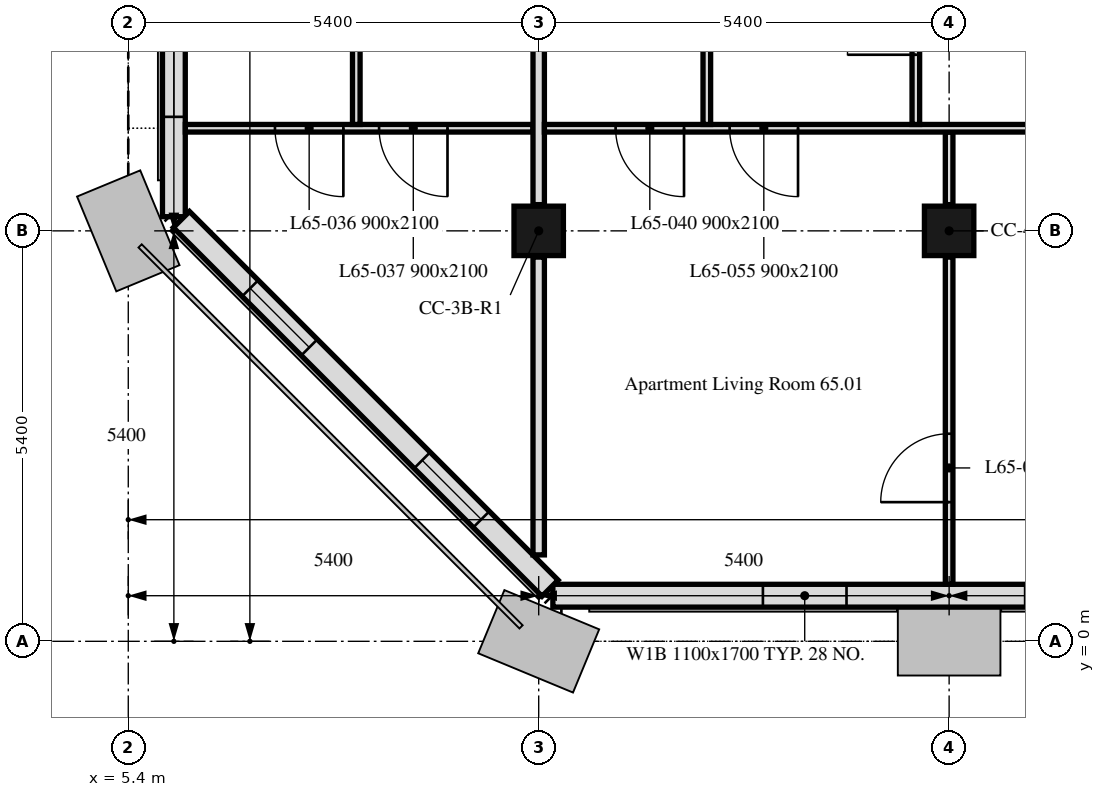
"""IFC4 building model, lengths in metres.
Left out: names, types, materials, properties, quantities, classifications, styles, units other than length and angle.
Written with IfcOpenShell. Run it as: python <this file> out.ifc"""

import sys

from ifc_helpers import new_model, si_unit, direction, frame, frame_2d, origin, origin_2d, place, context, subcontext, project, spatial, rectangle, extrude, element, fill, save


model = new_model("IFC4")
c1 = context("Model", 3, precision=1e-05, world=origin(), true_north=direction((0.0, 1.0)))
c2 = subcontext(c1, "Body", "Model", "MODEL_VIEW")
j1 = project(units=[si_unit("LENGTHUNIT", "METRE"), si_unit("PLANEANGLEUNIT", "RADIAN")], contexts=[c1])
p1 = place(None, origin())
s1 = spatial("IfcSite", under=j1, at=p1, CompositionType="ELEMENT")
p2 = place(p1, origin())
s2 = spatial("IfcBuilding", under=s1, at=p2, CompositionType="ELEMENT")
p3 = place(p2, frame((0.0, 0.0, 268.6)))
s3 = spatial("IfcBuildingStorey", under=s2, at=p3, CompositionType="ELEMENT", Elevation=268.6)
for number, where, z_axis, x_axis in (
    (1, (10.8, 5.4, 0.0), (0.0, 0.0, 1.0), (1.0, 0.0, 0.0)),
    (2, (16.2, 5.4, 0.0), (0.0, 0.0, 1.0), (1.0, 0.0, 0.0)),
):
    element("IfcColumn", number, at=place(p3, frame(where, z_axis=z_axis, x_axis=x_axis)), inside=s3, PredefinedType="COLUMN", context=c2, shape_type="SweptSolid", body=[
        extrude(rectangle(XDim=0.65, YDim=0.65, at=origin_2d()), origin(), (0.0, 0.0, 1.0), 3.0),
    ])
p4 = place(p3, frame((10.986, 0.6, 0.0), z_axis=(0.0, 0.0, 1.0), x_axis=(1.0, 0.0, 0.0)))
e3 = element("IfcWall", 3, at=p4, inside=s3, PredefinedType="SOLIDWALL", context=c2, shape_type="SweptSolid", body=[
    extrude(rectangle(XDim=32.027, YDim=0.3, at=frame_2d((16.014, 0.0))), origin(), (0.0, 0.0, 1.0), 3.0),
])
p5 = place(p4, frame((2.764, 0.0, 0.9)))
e4 = element("IfcOpeningElement", 4, at=p5, cuts=e3, PredefinedType="OPENING", context=c2, shape_type="SweptSolid", body=[
    extrude(rectangle(XDim=1.1, YDim=1.7, at=frame_2d((0.55, 0.85))), frame((0.0, 0.16, 0.0), z_axis=(0.0, -1.0, 0.0), x_axis=(1.0, 0.0, 0.0)), (0.0, 0.0, 1.0), 0.32),
])
p6 = place(p4, frame((6.214, 0.0, 0.9)))
e5 = element("IfcOpeningElement", 5, at=p6, cuts=e3, PredefinedType="OPENING", context=c2, shape_type="SweptSolid", body=[
    extrude(rectangle(XDim=3.4, YDim=1.7, at=frame_2d((1.7, 0.85))), frame((0.0, 0.16, 0.0), z_axis=(0.0, -1.0, 0.0), x_axis=(1.0, 0.0, 0.0)), (0.0, 0.0, 1.0), 0.32),
])
p7 = place(p4, frame((13.564, 0.0, 0.9)))
e6 = element("IfcOpeningElement", 6, at=p7, cuts=e3, PredefinedType="OPENING", context=c2, shape_type="SweptSolid", body=[
    extrude(rectangle(XDim=1.1, YDim=1.7, at=frame_2d((0.55, 0.85))), frame((0.0, 0.16, 0.0), z_axis=(0.0, -1.0, 0.0), x_axis=(1.0, 0.0, 0.0)), (0.0, 0.0, 1.0), 0.32),
])
p8 = place(p4, frame((17.014, 0.0, 0.9)))
e7 = element("IfcOpeningElement", 7, at=p8, cuts=e3, PredefinedType="OPENING", context=c2, shape_type="SweptSolid", body=[
    extrude(rectangle(XDim=3.4, YDim=1.7, at=frame_2d((1.7, 0.85))), frame((0.0, 0.16, 0.0), z_axis=(0.0, -1.0, 0.0), x_axis=(1.0, 0.0, 0.0)), (0.0, 0.0, 1.0), 0.32),
])
p9 = place(p4, frame((24.364, 0.0, 0.9)))
e8 = element("IfcOpeningElement", 8, at=p9, cuts=e3, PredefinedType="OPENING", context=c2, shape_type="SweptSolid", body=[
    extrude(rectangle(XDim=1.1, YDim=1.7, at=frame_2d((0.55, 0.85))), frame((0.0, 0.16, 0.0), z_axis=(0.0, -1.0, 0.0), x_axis=(1.0, 0.0, 0.0)), (0.0, 0.0, 1.0), 0.32),
])
p10 = place(p4, frame((27.814, 0.0, 0.9)))
e9 = element("IfcOpeningElement", 9, at=p10, cuts=e3, PredefinedType="OPENING", context=c2, shape_type="SweptSolid", body=[
    extrude(rectangle(XDim=3.4, YDim=1.7, at=frame_2d((1.7, 0.85))), frame((0.0, 0.16, 0.0), z_axis=(0.0, -1.0, 0.0), x_axis=(1.0, 0.0, 0.0)), (0.0, 0.0, 1.0), 0.32),
])
p11 = place(p3, frame((6.0, 16.2, 0.0), z_axis=(0.0, 0.0, 1.0), x_axis=(0.0, -1.0, 0.0)))
e10 = element("IfcWall", 10, at=p11, inside=s3, PredefinedType="SOLIDWALL", context=c2, shape_type="SweptSolid", body=[
    extrude(rectangle(XDim=10.614, YDim=0.3, at=frame_2d((5.307, 0.0))), origin(), (0.0, 0.0, 1.0), 3.0),
])
p12 = place(p11, frame((1.0, 0.0, 0.9)))
e11 = element("IfcOpeningElement", 11, at=p12, cuts=e10, PredefinedType="OPENING", context=c2, shape_type="SweptSolid", body=[
    extrude(rectangle(XDim=1.1, YDim=1.7, at=frame_2d((0.55, 0.85))), frame((0.0, 0.16, 0.0), z_axis=(0.0, -1.0, 0.0), x_axis=(1.0, 0.0, 0.0)), (0.0, 0.0, 1.0), 0.32),
])
p13 = place(p11, frame((2.95, 0.0, 0.9)))
e12 = element("IfcOpeningElement", 12, at=p13, cuts=e10, PredefinedType="OPENING", context=c2, shape_type="SweptSolid", body=[
    extrude(rectangle(XDim=1.1, YDim=1.7, at=frame_2d((0.55, 0.85))), frame((0.0, 0.16, 0.0), z_axis=(0.0, -1.0, 0.0), x_axis=(1.0, 0.0, 0.0)), (0.0, 0.0, 1.0), 0.32),
])
p14 = place(p11, frame((6.75, 0.0, 0.9)))
e13 = element("IfcOpeningElement", 13, at=p14, cuts=e10, PredefinedType="OPENING", context=c2, shape_type="SweptSolid", body=[
    extrude(rectangle(XDim=1.1, YDim=1.7, at=frame_2d((0.55, 0.85))), frame((0.0, 0.16, 0.0), z_axis=(0.0, -1.0, 0.0), x_axis=(1.0, 0.0, 0.0)), (0.0, 0.0, 1.0), 0.32),
])
p15 = place(p11, frame((8.2, 0.0, 0.9)))
e14 = element("IfcOpeningElement", 14, at=p15, cuts=e10, PredefinedType="OPENING", context=c2, shape_type="SweptSolid", body=[
    extrude(rectangle(XDim=1.1, YDim=1.7, at=frame_2d((0.55, 0.85))), frame((0.0, 0.16, 0.0), z_axis=(0.0, -1.0, 0.0), x_axis=(1.0, 0.0, 0.0)), (0.0, 0.0, 1.0), 0.32),
])
p16 = place(p3, frame((6.099, 5.55, 0.0), z_axis=(0.0, 0.0, 1.0), x_axis=(0.707106781187, -0.707106781187, 0.0)))
e15 = element("IfcWall", 15, at=p16, inside=s3, PredefinedType="SOLIDWALL", context=c2, shape_type="SweptSolid", body=[
    extrude(rectangle(XDim=6.86, YDim=0.3, at=frame_2d((3.43, 0.0))), origin(), (0.0, 0.0, 1.0), 3.0),
])
p17 = place(p16, frame((1.28, 0.0, 0.9)))
e16 = element("IfcOpeningElement", 16, at=p17, cuts=e15, PredefinedType="OPENING", context=c2, shape_type="SweptSolid", body=[
    extrude(rectangle(XDim=1.1, YDim=1.7, at=frame_2d((0.55, 0.85))), frame((0.0, 0.16, 0.0), z_axis=(0.0, -1.0, 0.0), x_axis=(1.0, 0.0, 0.0)), (0.0, 0.0, 1.0), 0.32),
])
p18 = place(p16, frame((4.48, 0.0, 0.9)))
e17 = element("IfcOpeningElement", 17, at=p18, cuts=e15, PredefinedType="OPENING", context=c2, shape_type="SweptSolid", body=[
    extrude(rectangle(XDim=1.1, YDim=1.7, at=frame_2d((0.55, 0.85))), frame((0.0, 0.16, 0.0), z_axis=(0.0, -1.0, 0.0), x_axis=(1.0, 0.0, 0.0)), (0.0, 0.0, 1.0), 0.32),
])
p19 = place(p3, frame((10.8, 1.137, 0.0), z_axis=(0.0, 0.0, 1.0), x_axis=(0.0, 1.0, 0.0)))
e18 = element("IfcWall", 18, at=p19, inside=s3, PredefinedType="PARTITIONING", context=c2, shape_type="SweptSolid", body=[
    extrude(rectangle(XDim=3.918, YDim=0.15, at=frame_2d((1.959, 0.0))), origin(), (0.0, 0.0, 1.0), 3.0),
])
p20 = place(p3, frame((10.725, 6.75, 0.0), z_axis=(0.0, 0.0, 1.0), x_axis=(-1.0, 0.0, 0.0)))
e19 = element("IfcWall", 19, at=p20, inside=s3, PredefinedType="PARTITIONING", context=c2, shape_type="SweptSolid", body=[
    extrude(rectangle(XDim=4.574, YDim=0.1, at=frame_2d((2.287, 0.0))), origin(), (0.0, 0.0, 1.0), 3.0),
])
p21 = place(p20, frame((2.495, 0.0, 0.0)))
e20 = element("IfcOpeningElement", 20, at=p21, cuts=e19, PredefinedType="OPENING", context=c2, shape_type="SweptSolid", body=[
    extrude(rectangle(XDim=0.9, YDim=2.1, at=frame_2d((0.45, 1.05))), frame((0.0, 0.05, 0.0), z_axis=(0.0, -1.0, 0.0), x_axis=(1.0, 0.0, 0.0)), (0.0, 0.0, 1.0), 0.1),
])
p22 = place(p20, frame((1.125, 0.0, 0.0)))
e21 = element("IfcOpeningElement", 21, at=p22, cuts=e19, PredefinedType="OPENING", context=c2, shape_type="SweptSolid", body=[
    extrude(rectangle(XDim=0.9, YDim=2.1, at=frame_2d((0.45, 1.05))), frame((0.0, 0.05, 0.0), z_axis=(0.0, -1.0, 0.0), x_axis=(1.0, 0.0, 0.0)), (0.0, 0.0, 1.0), 0.1),
])
p23 = place(p3, frame((8.4, 6.8, 0.0), z_axis=(0.0, 0.0, 1.0), x_axis=(0.0, 1.0, 0.0)))
e22 = element("IfcWall", 22, at=p23, inside=s3, PredefinedType="PARTITIONING", context=c2, shape_type="SweptSolid", body=[
    extrude(rectangle(XDim=7.075, YDim=0.1, at=frame_2d((3.538, 0.0))), origin(), (0.0, 0.0, 1.0), 3.0),
])
p24 = place(p23, frame((5.45, 0.0, 0.0)))
e23 = element("IfcOpeningElement", 23, at=p24, cuts=e22, PredefinedType="OPENING", context=c2, shape_type="SweptSolid", body=[
    extrude(rectangle(XDim=0.9, YDim=2.1, at=frame_2d((0.45, 1.05))), frame((0.0, 0.05, 0.0), z_axis=(0.0, -1.0, 0.0), x_axis=(1.0, 0.0, 0.0)), (0.0, 0.0, 1.0), 0.1),
])
p25 = place(p23, frame((1.717, 0.0, 0.0)))
e24 = element("IfcOpeningElement", 24, at=p25, cuts=e22, PredefinedType="OPENING", context=c2, shape_type="SweptSolid", body=[
    extrude(rectangle(XDim=0.9, YDim=2.1, at=frame_2d((0.45, 1.05))), frame((0.0, 0.05, 0.0), z_axis=(0.0, -1.0, 0.0), x_axis=(1.0, 0.0, 0.0)), (0.0, 0.0, 1.0), 0.1),
])
p26 = place(p3, frame((10.8, 5.745, 0.0), z_axis=(0.0, 0.0, 1.0), x_axis=(0.0, 1.0, 0.0)))
e25 = element("IfcWall", 25, at=p26, inside=s3, PredefinedType="PARTITIONING", context=c2, shape_type="SweptSolid", body=[
    extrude(rectangle(XDim=4.71, YDim=0.15, at=frame_2d((2.355, 0.0))), origin(), (0.0, 0.0, 1.0), 3.0),
])
p27 = place(p3, frame((16.2, 0.751, 0.0), z_axis=(0.0, 0.0, 1.0), x_axis=(0.0, 1.0, 0.0)))
e26 = element("IfcWall", 26, at=p27, inside=s3, PredefinedType="PARTITIONING", context=c2, shape_type="SweptSolid", body=[
    extrude(rectangle(XDim=4.304, YDim=0.1, at=frame_2d((2.152, 0.0))), origin(), (0.0, 0.0, 1.0), 2.4),
])
p28 = place(p27, frame((1.08, 0.0, 0.0)))
e27 = element("IfcOpeningElement", 27, at=p28, cuts=e26, PredefinedType="OPENING", context=c2, shape_type="SweptSolid", body=[
    extrude(rectangle(XDim=0.9, YDim=2.1, at=frame_2d((0.45, 1.05))), frame((0.0, 0.05, 0.0), z_axis=(0.0, -1.0, 0.0), x_axis=(1.0, 0.0, 0.0)), (0.0, 0.0, 1.0), 0.1),
])
p29 = place(p3, frame((16.2, 5.745, 0.0), z_axis=(0.0, 0.0, 1.0), x_axis=(0.0, 1.0, 0.0)))
e28 = element("IfcWall", 28, at=p29, inside=s3, PredefinedType="PARTITIONING", context=c2, shape_type="SweptSolid", body=[
    extrude(rectangle(XDim=0.955, YDim=0.1, at=frame_2d((0.478, 0.0))), origin(), (0.0, 0.0, 1.0), 2.4),
])
p30 = place(p3, frame((21.525, 6.75, 0.0), z_axis=(0.0, 0.0, 1.0), x_axis=(-1.0, 0.0, 0.0)))
e29 = element("IfcWall", 29, at=p30, inside=s3, PredefinedType="PARTITIONING", context=c2, shape_type="SweptSolid", body=[
    extrude(rectangle(XDim=10.65, YDim=0.1, at=frame_2d((5.325, 0.0))), origin(), (0.0, 0.0, 1.0), 2.4),
])
p31 = place(p30, frame((8.813, 0.0, 0.0)))
e30 = element("IfcOpeningElement", 30, at=p31, cuts=e29, PredefinedType="OPENING", context=c2, shape_type="SweptSolid", body=[
    extrude(rectangle(XDim=0.9, YDim=2.1, at=frame_2d((0.45, 1.05))), frame((0.0, 0.05, 0.0), z_axis=(0.0, -1.0, 0.0), x_axis=(1.0, 0.0, 0.0)), (0.0, 0.0, 1.0), 0.1),
])
p32 = place(p30, frame((1.675, 0.0, 0.0)))
e31 = element("IfcOpeningElement", 31, at=p32, cuts=e29, PredefinedType="OPENING", context=c2, shape_type="SweptSolid", body=[
    extrude(rectangle(XDim=0.9, YDim=2.1, at=frame_2d((0.45, 1.05))), frame((0.0, 0.05, 0.0), z_axis=(0.0, -1.0, 0.0), x_axis=(1.0, 0.0, 0.0)), (0.0, 0.0, 1.0), 0.1),
])
p33 = place(p30, frame((7.313, 0.0, 0.0)))
e32 = element("IfcOpeningElement", 32, at=p33, cuts=e29, PredefinedType="OPENING", context=c2, shape_type="SweptSolid", body=[
    extrude(rectangle(XDim=0.9, YDim=2.1, at=frame_2d((0.45, 1.05))), frame((0.0, 0.05, 0.0), z_axis=(0.0, -1.0, 0.0), x_axis=(1.0, 0.0, 0.0)), (0.0, 0.0, 1.0), 0.1),
])
p34 = place(p3, frame((13.012, 6.8, 0.0), z_axis=(0.0, 0.0, 1.0), x_axis=(0.0, 1.0, 0.0)))
e33 = element("IfcWall", 33, at=p34, inside=s3, PredefinedType="PARTITIONING", context=c2, shape_type="SweptSolid", body=[
    extrude(rectangle(XDim=7.075, YDim=0.1, at=frame_2d((3.538, 0.0))), origin(), (0.0, 0.0, 1.0), 3.0),
])
p35 = place(p34, frame((5.617, 0.0, 0.0)))
e34 = element("IfcOpeningElement", 34, at=p35, cuts=e33, PredefinedType="OPENING", context=c2, shape_type="SweptSolid", body=[
    extrude(rectangle(XDim=0.9, YDim=2.1, at=frame_2d((0.45, 1.05))), frame((0.0, 0.05, 0.0), z_axis=(0.0, -1.0, 0.0), x_axis=(1.0, 0.0, 0.0)), (0.0, 0.0, 1.0), 0.1),
])
p36 = place(p34, frame((1.45, 0.0, 0.0)))
e35 = element("IfcOpeningElement", 35, at=p36, cuts=e33, PredefinedType="OPENING", context=c2, shape_type="SweptSolid", body=[
    extrude(rectangle(XDim=0.9, YDim=2.1, at=frame_2d((0.45, 1.05))), frame((0.0, 0.05, 0.0), z_axis=(0.0, -1.0, 0.0), x_axis=(1.0, 0.0, 0.0)), (0.0, 0.0, 1.0), 0.1),
])
p37 = place(p3, frame((15.762, 6.8, 0.0), z_axis=(0.0, 0.0, 1.0), x_axis=(0.0, 1.0, 0.0)))
e36 = element("IfcWall", 36, at=p37, inside=s3, PredefinedType="PARTITIONING", context=c2, shape_type="SweptSolid", body=[
    extrude(rectangle(XDim=7.075, YDim=0.1, at=frame_2d((3.538, 0.0))), origin(), (0.0, 0.0, 1.0), 3.0),
])
p38 = place(p37, frame((0.917, 0.0, 0.0)))
e37 = element("IfcOpeningElement", 37, at=p38, cuts=e36, PredefinedType="OPENING", context=c2, shape_type="SweptSolid", body=[
    extrude(rectangle(XDim=0.9, YDim=2.1, at=frame_2d((0.45, 1.05))), frame((0.0, 0.05, 0.0), z_axis=(0.0, -1.0, 0.0), x_axis=(1.0, 0.0, 0.0)), (0.0, 0.0, 1.0), 0.1),
])
p39 = place(p37, frame((5.925, 0.0, 0.0)))
e38 = element("IfcOpeningElement", 38, at=p39, cuts=e36, PredefinedType="OPENING", context=c2, shape_type="SweptSolid", body=[
    extrude(rectangle(XDim=0.9, YDim=2.1, at=frame_2d((0.45, 1.05))), frame((0.0, 0.05, 0.0), z_axis=(0.0, -1.0, 0.0), x_axis=(1.0, 0.0, 0.0)), (0.0, 0.0, 1.0), 0.1),
])
p40 = place(p5, origin())
e39 = element("IfcWindow", 39, at=p40, inside=s3, PartitioningType="SINGLE_PANEL", PredefinedType="WINDOW", context=c2, shape_type="SweptSolid", body=[
    extrude(rectangle(XDim=1.1, YDim=1.7, at=frame_2d((0.55, 0.85))), frame((0.0, 0.03, 0.0), z_axis=(0.0, -1.0, 0.0), x_axis=(1.0, 0.0, 0.0)), (0.0, 0.0, 1.0), 0.06),
])
fill(e4, e39)
p41 = place(p15, origin())
e40 = element("IfcWindow", 40, at=p41, inside=s3, PartitioningType="SINGLE_PANEL", PredefinedType="WINDOW", context=c2, shape_type="SweptSolid", body=[
    extrude(rectangle(XDim=1.1, YDim=1.7, at=frame_2d((0.55, 0.85))), frame((0.0, 0.03, 0.0), z_axis=(0.0, -1.0, 0.0), x_axis=(1.0, 0.0, 0.0)), (0.0, 0.0, 1.0), 0.06),
])
fill(e14, e40)
p42 = place(p17, origin())
e41 = element("IfcWindow", 41, at=p42, inside=s3, PartitioningType="SINGLE_PANEL", PredefinedType="WINDOW", context=c2, shape_type="SweptSolid", body=[
    extrude(rectangle(XDim=1.1, YDim=1.7, at=frame_2d((0.55, 0.85))), frame((0.0, 0.03, 0.0), z_axis=(0.0, -1.0, 0.0), x_axis=(1.0, 0.0, 0.0)), (0.0, 0.0, 1.0), 0.06),
])
fill(e16, e41)
p43 = place(p18, origin())
e42 = element("IfcWindow", 42, at=p43, inside=s3, PartitioningType="SINGLE_PANEL", PredefinedType="WINDOW", context=c2, shape_type="SweptSolid", body=[
    extrude(rectangle(XDim=1.1, YDim=1.7, at=frame_2d((0.55, 0.85))), frame((0.0, 0.03, 0.0), z_axis=(0.0, -1.0, 0.0), x_axis=(1.0, 0.0, 0.0)), (0.0, 0.0, 1.0), 0.06),
])
fill(e17, e42)
p44 = place(p38, origin())
e43 = element("IfcDoor", 43, at=p44, inside=s3, OperationType="SINGLE_SWING_RIGHT", PredefinedType="DOOR", context=c2, shape_type="SweptSolid", body=[
    extrude(rectangle(XDim=0.9, YDim=2.1, at=frame_2d((0.45, 1.05))), frame((0.0, 0.025, 0.0), z_axis=(0.0, -1.0, 0.0), x_axis=(1.0, 0.0, 0.0)), (0.0, 0.0, 1.0), 0.05),
])
fill(e37, e43)
p45 = place(p21, origin())
e44 = element("IfcDoor", 44, at=p45, inside=s3, OperationType="SINGLE_SWING_LEFT", PredefinedType="DOOR", context=c2, shape_type="SweptSolid", body=[
    extrude(rectangle(XDim=0.9, YDim=2.1, at=frame_2d((0.45, 1.05))), frame((0.0, 0.025, 0.0), z_axis=(0.0, -1.0, 0.0), x_axis=(1.0, 0.0, 0.0)), (0.0, 0.0, 1.0), 0.05),
])
fill(e20, e44)
p46 = place(p22, origin())
e45 = element("IfcDoor", 45, at=p46, inside=s3, OperationType="SINGLE_SWING_RIGHT", PredefinedType="DOOR", context=c2, shape_type="SweptSolid", body=[
    extrude(rectangle(XDim=0.9, YDim=2.1, at=frame_2d((0.45, 1.05))), frame((0.0, 0.025, 0.0), z_axis=(0.0, -1.0, 0.0), x_axis=(1.0, 0.0, 0.0)), (0.0, 0.0, 1.0), 0.05),
])
fill(e21, e45)
p47 = place(p28, origin())
e46 = element("IfcDoor", 46, at=p47, inside=s3, OperationType="SINGLE_SWING_RIGHT", PredefinedType="DOOR", context=c2, shape_type="SweptSolid", body=[
    extrude(rectangle(XDim=0.9, YDim=2.1, at=frame_2d((0.45, 1.05))), frame((0.0, 0.025, 0.0), z_axis=(0.0, -1.0, 0.0), x_axis=(1.0, 0.0, 0.0)), (0.0, 0.0, 1.0), 0.05),
])
fill(e27, e46)
p48 = place(p31, origin())
e47 = element("IfcDoor", 47, at=p48, inside=s3, OperationType="SINGLE_SWING_LEFT", PredefinedType="DOOR", context=c2, shape_type="SweptSolid", body=[
    extrude(rectangle(XDim=0.9, YDim=2.1, at=frame_2d((0.45, 1.05))), frame((0.0, 0.025, 0.0), z_axis=(0.0, -1.0, 0.0), x_axis=(1.0, 0.0, 0.0)), (0.0, 0.0, 1.0), 0.05),
])
fill(e30, e47)
p49 = place(p33, origin())
e48 = element("IfcDoor", 48, at=p49, inside=s3, OperationType="SINGLE_SWING_RIGHT", PredefinedType="DOOR", context=c2, shape_type="SweptSolid", body=[
    extrude(rectangle(XDim=0.9, YDim=2.1, at=frame_2d((0.45, 1.05))), frame((0.0, 0.025, 0.0), z_axis=(0.0, -1.0, 0.0), x_axis=(1.0, 0.0, 0.0)), (0.0, 0.0, 1.0), 0.05),
])
fill(e32, e48)
save(model, sys.argv[1])
